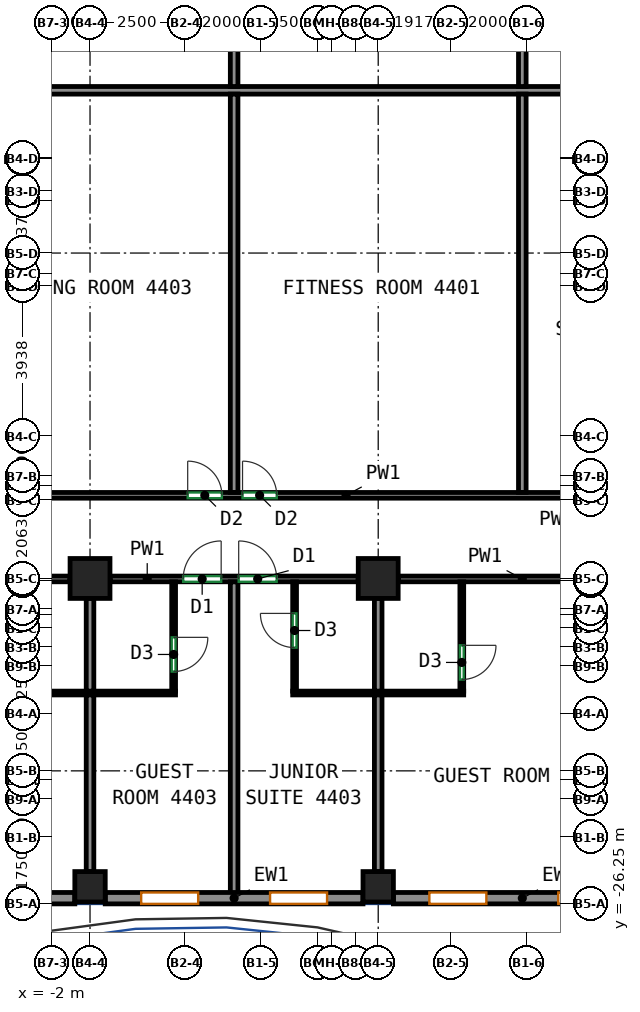
"""IFC4 building model, lengths in metres.
Left out: names, types, materials, properties, quantities, classifications, styles, units other than length and angle.
Written with IfcOpenShell. Run it as: python <this file> out.ifc"""

import sys

from ifc_helpers import new_model, si_unit, direction, frame, frame_2d, origin, origin_2d, place, context, subcontext, project, spatial, rectangle, extrude, source, transform, mapped, element, fill, save


model = new_model("IFC4")
c1 = context("Model", 3, precision=1e-05, world=origin(), true_north=direction((0.0, 1.0)))
c2 = subcontext(c1, "Body", "Model", "MODEL_VIEW")
j1 = project(units=[si_unit("LENGTHUNIT", "METRE"), si_unit("PLANEANGLEUNIT", "RADIAN")], contexts=[c1])
p1 = place(None, origin())
s1 = spatial("IfcSite", under=j1, at=p1, CompositionType="ELEMENT")
p2 = place(p1, origin())
s2 = spatial("IfcBuilding", under=s1, at=p2, CompositionType="ELEMENT")
p3 = place(p2, frame((0.0, 0.0, 185.5)))
s3 = spatial("IfcBuildingStorey", under=s2, at=p3, CompositionType="ELEMENT", Elevation=185.5)
m1 = source(origin(), c2, "Body", "SweptSolid", [
    extrude(rectangle(XDim=0.8, YDim=0.8, at=origin_2d()), origin(), (0.0, 0.0, 1.0), 3.12),
])
p4 = place(p3, frame((-1.0, -25.8, 0.0), z_axis=(0.0, 0.0, 1.0), x_axis=(1.0, 0.0, 0.0)))
e1 = element("IfcColumn", 1, at=p4, inside=s3, PredefinedType="COLUMN", context=c2, shape_type="MappedRepresentation", body=[
    mapped(m1, transform((0.0, 0.0, 0.0))),
])
m2 = source(origin(), c2, "Body", "SweptSolid", [
    extrude(rectangle(XDim=1.05, YDim=1.05, at=origin_2d()), origin(), (0.0, 0.0, 1.0), 3.12),
])
p5 = place(p3, frame((-1.0, -17.688, 0.0), z_axis=(0.0, 0.0, 1.0), x_axis=(1.0, 0.0, 0.0)))
e2 = element("IfcColumn", 2, at=p5, inside=s3, PredefinedType="COLUMN", context=c2, shape_type="MappedRepresentation", body=[
    mapped(m2, transform((0.0, 0.0, 0.0))),
])
p6 = place(p3, frame((6.583, -25.8, 0.0), z_axis=(0.0, 0.0, 1.0), x_axis=(1.0, 0.0, 0.0)))
e3 = element("IfcColumn", 3, at=p6, inside=s3, PredefinedType="COLUMN", context=c2, shape_type="MappedRepresentation", body=[
    mapped(m1, transform((0.0, 0.0, 0.0))),
])
p7 = place(p3, frame((6.583, -17.688, 0.0), z_axis=(0.0, 0.0, 1.0), x_axis=(1.0, 0.0, 0.0)))
e4 = element("IfcColumn", 4, at=p7, inside=s3, PredefinedType="COLUMN", context=c2, shape_type="MappedRepresentation", body=[
    mapped(m2, transform((0.0, 0.0, 0.0))),
])
m3 = source(origin(), c2, "Body", "SweptSolid", [
    extrude(rectangle(XDim=6.783, YDim=0.3, at=frame_2d((3.392, 0.0))), origin(), (0.0, 0.0, 1.0), 3.12),
])
p8 = place(p3, frame((-8.183, -26.1, 0.0), z_axis=(0.0, 0.0, 1.0), x_axis=(1.0, 0.0, 0.0)))
e5 = element("IfcWall", 5, at=p8, inside=s3, PredefinedType="SOLIDWALL", context=c2, shape_type="MappedRepresentation", body=[
    mapped(m3, transform((0.0, 0.0, 0.0))),
])
p9 = place(p8, frame((0.946, 0.0, 0.85)))
e6 = element("IfcOpeningElement", 6, at=p9, cuts=e5, PredefinedType="OPENING", context=c2, shape_type="SweptSolid", body=[
    extrude(rectangle(XDim=1.5, YDim=1.95, at=frame_2d((0.75, 0.975))), frame((0.0, 0.16, 0.0), z_axis=(0.0, -1.0, 0.0), x_axis=(1.0, 0.0, 0.0)), (0.0, 0.0, 1.0), 0.32),
])
p10 = place(p8, frame((4.337, 0.0, 0.85)))
e7 = element("IfcOpeningElement", 7, at=p10, cuts=e5, PredefinedType="OPENING", context=c2, shape_type="SweptSolid", body=[
    extrude(rectangle(XDim=1.5, YDim=1.95, at=frame_2d((0.75, 0.975))), frame((0.0, 0.16, 0.0), z_axis=(0.0, -1.0, 0.0), x_axis=(1.0, 0.0, 0.0)), (0.0, 0.0, 1.0), 0.32),
])
p11 = place(p3, frame((-0.6, -26.1, 0.0), z_axis=(0.0, 0.0, 1.0), x_axis=(1.0, 0.0, 0.0)))
e8 = element("IfcWall", 8, at=p11, inside=s3, PredefinedType="SOLIDWALL", context=c2, shape_type="MappedRepresentation", body=[
    mapped(m3, transform((0.0, 0.0, 0.0))),
])
p12 = place(p11, frame((0.946, 0.0, 0.85)))
e9 = element("IfcOpeningElement", 9, at=p12, cuts=e8, PredefinedType="OPENING", context=c2, shape_type="SweptSolid", body=[
    extrude(rectangle(XDim=1.5, YDim=1.95, at=frame_2d((0.75, 0.975))), frame((0.0, 0.16, 0.0), z_axis=(0.0, -1.0, 0.0), x_axis=(1.0, 0.0, 0.0)), (0.0, 0.0, 1.0), 0.32),
])
p13 = place(p11, frame((4.337, 0.0, 0.85)))
e10 = element("IfcOpeningElement", 10, at=p13, cuts=e8, PredefinedType="OPENING", context=c2, shape_type="SweptSolid", body=[
    extrude(rectangle(XDim=1.5, YDim=1.95, at=frame_2d((0.75, 0.975))), frame((0.0, 0.16, 0.0), z_axis=(0.0, -1.0, 0.0), x_axis=(1.0, 0.0, 0.0)), (0.0, 0.0, 1.0), 0.32),
])
m4 = source(origin(), c2, "Body", "SweptSolid", [
    extrude(rectangle(XDim=6.783, YDim=0.3, at=frame_2d((3.392, 0.0))), origin(), (0.0, 0.0, 1.0), 3.12),
])
p14 = place(p3, frame((6.983, -26.1, 0.0), z_axis=(0.0, 0.0, 1.0), x_axis=(1.0, 0.0, 0.0)))
e11 = element("IfcWall", 11, at=p14, inside=s3, PredefinedType="SOLIDWALL", context=c2, shape_type="MappedRepresentation", body=[
    mapped(m4, transform((0.0, 0.0, 0.0))),
])
p15 = place(p14, frame((0.946, 0.0, 0.85)))
e12 = element("IfcOpeningElement", 12, at=p15, cuts=e11, PredefinedType="OPENING", context=c2, shape_type="SweptSolid", body=[
    extrude(rectangle(XDim=1.5, YDim=1.95, at=frame_2d((0.75, 0.975))), frame((0.0, 0.16, 0.0), z_axis=(0.0, -1.0, 0.0), x_axis=(1.0, 0.0, 0.0)), (0.0, 0.0, 1.0), 0.32),
])
p16 = place(p14, frame((4.338, 0.0, 0.85)))
e13 = element("IfcOpeningElement", 13, at=p16, cuts=e11, PredefinedType="OPENING", context=c2, shape_type="SweptSolid", body=[
    extrude(rectangle(XDim=1.5, YDim=1.95, at=frame_2d((0.75, 0.975))), frame((0.0, 0.16, 0.0), z_axis=(0.0, -1.0, 0.0), x_axis=(1.0, 0.0, 0.0)), (0.0, 0.0, 1.0), 0.32),
])
p17 = place(p3, frame((-8.058, -17.7, 0.0), z_axis=(0.0, 0.0, 1.0), x_axis=(1.0, 0.0, 0.0)))
e14 = element("IfcWall", 14, at=p17, inside=s3, PredefinedType="PARTITIONING", context=c2, shape_type="SweptSolid", body=[
    extrude(rectangle(XDim=6.533, YDim=0.15, at=frame_2d((3.267, 0.0))), origin(), (0.0, 0.0, 1.0), 3.12),
])
p18 = place(p17, frame((3.26, 0.0, 0.0)))
e15 = element("IfcOpeningElement", 15, at=p18, cuts=e14, PredefinedType="OPENING", context=c2, shape_type="SweptSolid", body=[
    extrude(rectangle(XDim=1.0, YDim=2.1, at=frame_2d((0.5, 1.05))), frame((0.0, 0.085, 0.0), z_axis=(0.0, -1.0, 0.0), x_axis=(1.0, 0.0, 0.0)), (0.0, 0.0, 1.0), 0.17),
])
p19 = place(p3, frame((-0.475, -17.7, 0.0), z_axis=(0.0, 0.0, 1.0), x_axis=(1.0, 0.0, 0.0)))
e16 = element("IfcWall", 16, at=p19, inside=s3, PredefinedType="PARTITIONING", context=c2, shape_type="SweptSolid", body=[
    extrude(rectangle(XDim=6.533, YDim=0.15, at=frame_2d((3.267, 0.0))), origin(), (0.0, 0.0, 1.0), 3.12),
])
p20 = place(p19, frame((1.926, 0.0, 0.0)))
e17 = element("IfcOpeningElement", 17, at=p20, cuts=e16, PredefinedType="OPENING", context=c2, shape_type="SweptSolid", body=[
    extrude(rectangle(XDim=1.0, YDim=2.1, at=frame_2d((0.5, 1.05))), frame((0.0, 0.085, 0.0), z_axis=(0.0, -1.0, 0.0), x_axis=(1.0, 0.0, 0.0)), (0.0, 0.0, 1.0), 0.17),
])
p21 = place(p19, frame((3.387, 0.0, 0.0)))
e18 = element("IfcOpeningElement", 18, at=p21, cuts=e16, PredefinedType="OPENING", context=c2, shape_type="SweptSolid", body=[
    extrude(rectangle(XDim=1.0, YDim=2.1, at=frame_2d((0.5, 1.05))), frame((0.0, 0.085, 0.0), z_axis=(0.0, -1.0, 0.0), x_axis=(1.0, 0.0, 0.0)), (0.0, 0.0, 1.0), 0.17),
])
p22 = place(p3, frame((7.108, -17.7, 0.0), z_axis=(0.0, 0.0, 1.0), x_axis=(1.0, 0.0, 0.0)))
e19 = element("IfcWall", 19, at=p22, inside=s3, PredefinedType="PARTITIONING", context=c2, shape_type="SweptSolid", body=[
    extrude(rectangle(XDim=6.534, YDim=0.15, at=frame_2d((3.267, 0.0))), origin(), (0.0, 0.0, 1.0), 3.12),
])
p23 = place(p22, frame((4.722, 0.0, 0.0)))
e20 = element("IfcOpeningElement", 20, at=p23, cuts=e19, PredefinedType="OPENING", context=c2, shape_type="SweptSolid", body=[
    extrude(rectangle(XDim=1.0, YDim=2.1, at=frame_2d((0.5, 1.05))), frame((0.0, 0.085, 0.0), z_axis=(0.0, -1.0, 0.0), x_axis=(1.0, 0.0, 0.0)), (0.0, 0.0, 1.0), 0.17),
])
p24 = place(p3, frame((-4.802, -15.5, 0.0), z_axis=(0.0, 0.0, 1.0), x_axis=(1.0, 0.0, 0.0)))
e21 = element("IfcWall", 21, at=p24, inside=s3, PredefinedType="PARTITIONING", context=c2, shape_type="SweptSolid", body=[
    extrude(rectangle(XDim=21.077, YDim=0.15, at=frame_2d((10.539, 0.0))), origin(), (0.0, 0.0, 1.0), 3.12),
])
p25 = place(p24, frame((6.372, 0.0, 0.0)))
e22 = element("IfcOpeningElement", 22, at=p25, cuts=e21, PredefinedType="OPENING", context=c2, shape_type="SweptSolid", body=[
    extrude(rectangle(XDim=0.9, YDim=2.1, at=frame_2d((0.45, 1.05))), frame((0.0, 0.085, 0.0), z_axis=(0.0, -1.0, 0.0), x_axis=(1.0, 0.0, 0.0)), (0.0, 0.0, 1.0), 0.17),
])
p26 = place(p24, frame((7.815, 0.0, 0.0)))
e23 = element("IfcOpeningElement", 23, at=p26, cuts=e21, PredefinedType="OPENING", context=c2, shape_type="SweptSolid", body=[
    extrude(rectangle(XDim=0.9, YDim=2.1, at=frame_2d((0.45, 1.05))), frame((0.0, 0.085, 0.0), z_axis=(0.0, -1.0, 0.0), x_axis=(1.0, 0.0, 0.0)), (0.0, 0.0, 1.0), 0.17),
])
p27 = place(p3, frame((-3.25, -20.702, 0.0), z_axis=(0.0, 0.0, 1.0), x_axis=(1.0, 0.0, 0.0)))
e24 = element("IfcWall", 24, at=p27, inside=s3, PredefinedType="PARTITIONING", context=c2, shape_type="SweptSolid", body=[
    extrude(rectangle(XDim=4.5, YDim=0.1, at=frame_2d((2.25, 0.0))), origin(), (0.0, 0.0, 1.0), 3.12),
])
p28 = place(p3, frame((-1.0, -25.4, 0.0), z_axis=(0.0, 0.0, 1.0), x_axis=(0.0, 1.0, 0.0)))
e25 = element("IfcWall", 25, at=p28, inside=s3, PredefinedType="PARTITIONING", context=c2, shape_type="SweptSolid", body=[
    extrude(rectangle(XDim=4.648, YDim=0.2, at=frame_2d((2.324, 0.0))), origin(), (0.0, 0.0, 1.0), 3.12),
])
p29 = place(p3, frame((-1.0, -20.652, 0.0), z_axis=(0.0, 0.0, 1.0), x_axis=(0.0, 1.0, 0.0)))
e26 = element("IfcWall", 26, at=p29, inside=s3, PredefinedType="PARTITIONING", context=c2, shape_type="SweptSolid", body=[
    extrude(rectangle(XDim=2.44, YDim=0.2, at=frame_2d((1.22, 0.0))), origin(), (0.0, 0.0, 1.0), 3.12),
])
p30 = place(p3, frame((1.2, -17.777, 0.0), z_axis=(0.0, 0.0, 1.0), x_axis=(0.0, -1.0, 0.0)))
e27 = element("IfcWall", 27, at=p30, inside=s3, PredefinedType="PARTITIONING", context=c2, shape_type="SweptSolid", body=[
    extrude(rectangle(XDim=2.875, YDim=0.1, at=frame_2d((1.438, 0.0))), origin(), (0.0, 0.0, 1.0), 3.12),
])
p31 = place(p30, frame((1.46, 0.0, 0.0)))
e28 = element("IfcOpeningElement", 28, at=p31, cuts=e27, PredefinedType="OPENING", context=c2, shape_type="SweptSolid", body=[
    extrude(rectangle(XDim=0.9, YDim=2.1, at=frame_2d((0.45, 1.05))), frame((0.0, 0.06, 0.0), z_axis=(0.0, -1.0, 0.0), x_axis=(1.0, 0.0, 0.0)), (0.0, 0.0, 1.0), 0.12),
])
p32 = place(p3, frame((2.792, -26.0, 0.0), z_axis=(0.0, 0.0, 1.0), x_axis=(0.0, 1.0, 0.0)))
e29 = element("IfcWall", 29, at=p32, inside=s3, PredefinedType="PARTITIONING", context=c2, shape_type="SweptSolid", body=[
    extrude(rectangle(XDim=8.223, YDim=0.2, at=frame_2d((4.111, 0.0))), origin(), (0.0, 0.0, 1.0), 3.12),
])
p33 = place(p3, frame((4.383, -20.652, 0.0), z_axis=(0.0, 0.0, 1.0), x_axis=(0.0, 1.0, 0.0)))
e30 = element("IfcWall", 30, at=p33, inside=s3, PredefinedType="PARTITIONING", context=c2, shape_type="SweptSolid", body=[
    extrude(rectangle(XDim=2.875, YDim=0.1, at=frame_2d((1.438, 0.0))), origin(), (0.0, 0.0, 1.0), 3.12),
])
p34 = place(p33, frame((1.145, 0.0, 0.0)))
e31 = element("IfcOpeningElement", 31, at=p34, cuts=e30, PredefinedType="OPENING", context=c2, shape_type="SweptSolid", body=[
    extrude(rectangle(XDim=0.9, YDim=2.1, at=frame_2d((0.45, 1.05))), frame((0.0, 0.06, 0.0), z_axis=(0.0, -1.0, 0.0), x_axis=(1.0, 0.0, 0.0)), (0.0, 0.0, 1.0), 0.12),
])
p35 = place(p3, frame((4.333, -20.702, 0.0), z_axis=(0.0, 0.0, 1.0), x_axis=(1.0, 0.0, 0.0)))
e32 = element("IfcWall", 32, at=p35, inside=s3, PredefinedType="PARTITIONING", context=c2, shape_type="SweptSolid", body=[
    extrude(rectangle(XDim=4.5, YDim=0.1, at=frame_2d((2.25, 0.0))), origin(), (0.0, 0.0, 1.0), 3.12),
])
p36 = place(p3, frame((6.583, -25.4, 0.0), z_axis=(0.0, 0.0, 1.0), x_axis=(0.0, 1.0, 0.0)))
e33 = element("IfcWall", 33, at=p36, inside=s3, PredefinedType="PARTITIONING", context=c2, shape_type="SweptSolid", body=[
    extrude(rectangle(XDim=4.648, YDim=0.2, at=frame_2d((2.324, 0.0))), origin(), (0.0, 0.0, 1.0), 3.12),
])
p37 = place(p3, frame((6.583, -20.652, 0.0), z_axis=(0.0, 0.0, 1.0), x_axis=(0.0, 1.0, 0.0)))
e34 = element("IfcWall", 34, at=p37, inside=s3, PredefinedType="PARTITIONING", context=c2, shape_type="SweptSolid", body=[
    extrude(rectangle(XDim=2.44, YDim=0.2, at=frame_2d((1.22, 0.0))), origin(), (0.0, 0.0, 1.0), 3.12),
])
p38 = place(p3, frame((8.783, -17.777, 0.0), z_axis=(0.0, 0.0, 1.0), x_axis=(0.0, -1.0, 0.0)))
e35 = element("IfcWall", 35, at=p38, inside=s3, PredefinedType="PARTITIONING", context=c2, shape_type="SweptSolid", body=[
    extrude(rectangle(XDim=2.875, YDim=0.1, at=frame_2d((1.438, 0.0))), origin(), (0.0, 0.0, 1.0), 3.12),
])
p39 = place(p38, frame((1.67, 0.0, 0.0)))
e36 = element("IfcOpeningElement", 36, at=p39, cuts=e35, PredefinedType="OPENING", context=c2, shape_type="SweptSolid", body=[
    extrude(rectangle(XDim=0.9, YDim=2.1, at=frame_2d((0.45, 1.05))), frame((0.0, 0.06, 0.0), z_axis=(0.0, -1.0, 0.0), x_axis=(1.0, 0.0, 0.0)), (0.0, 0.0, 1.0), 0.12),
])
p40 = place(p3, frame((-13.873, -4.843, 0.0), z_axis=(0.0, 0.0, 1.0), x_axis=(1.0, 0.0, 0.0)))
e37 = element("IfcWall", 37, at=p40, inside=s3, PredefinedType="PARTITIONING", context=c2, shape_type="SweptSolid", body=[
    extrude(rectangle(XDim=30.146, YDim=0.2, at=frame_2d((15.073, 0.0))), origin(), (0.0, 0.0, 1.0), 3.12),
])
for number, where, z_axis, x_axis in (
    (38, (2.792, -4.743, 0.0), (0.0, 0.0, 1.0), (0.0, 1.0, 0.0)),
    (39, (10.375, -4.743, 0.0), (0.0, 0.0, 1.0), (0.0, 1.0, 0.0)),
):
    element("IfcWall", number, at=place(p3, frame(where, z_axis=z_axis, x_axis=x_axis)), inside=s3, PredefinedType="PARTITIONING", context=c2, shape_type="SweptSolid", body=[
        extrude(rectangle(XDim=8.366, YDim=0.2, at=frame_2d((4.183, 0.0))), origin(), (0.0, 0.0, 1.0), 3.12),
    ])
for number, where, z_axis, x_axis in (
    (40, (2.792, -15.423, 0.0), (0.0, 0.0, 1.0), (0.0, 1.0, 0.0)),
    (41, (10.375, -15.423, 0.0), (0.0, 0.0, 1.0), (0.0, 1.0, 0.0)),
):
    element("IfcWall", number, at=place(p3, frame(where, z_axis=z_axis, x_axis=x_axis)), inside=s3, PredefinedType="PARTITIONING", context=c2, shape_type="SweptSolid", body=[
        extrude(rectangle(XDim=10.48, YDim=0.2, at=frame_2d((5.24, 0.0))), origin(), (0.0, 0.0, 1.0), 3.12),
    ])
p41 = place(p12, origin())
e42 = element("IfcWindow", 42, at=p41, inside=s3, PartitioningType="SINGLE_PANEL", PredefinedType="WINDOW", context=c2, shape_type="SweptSolid", body=[
    extrude(rectangle(XDim=1.5, YDim=1.95, at=frame_2d((0.75, 0.975))), frame((0.0, 0.03, 0.0), z_axis=(0.0, -1.0, 0.0), x_axis=(1.0, 0.0, 0.0)), (0.0, 0.0, 1.0), 0.06),
])
fill(e9, e42)
p42 = place(p13, origin())
e43 = element("IfcWindow", 43, at=p42, inside=s3, PartitioningType="SINGLE_PANEL", PredefinedType="WINDOW", context=c2, shape_type="SweptSolid", body=[
    extrude(rectangle(XDim=1.5, YDim=1.95, at=frame_2d((0.75, 0.975))), frame((0.0, 0.03, 0.0), z_axis=(0.0, -1.0, 0.0), x_axis=(1.0, 0.0, 0.0)), (0.0, 0.0, 1.0), 0.06),
])
fill(e10, e43)
p43 = place(p15, origin())
e44 = element("IfcWindow", 44, at=p43, inside=s3, PartitioningType="SINGLE_PANEL", PredefinedType="WINDOW", context=c2, shape_type="SweptSolid", body=[
    extrude(rectangle(XDim=1.5, YDim=1.95, at=frame_2d((0.75, 0.975))), frame((0.0, 0.03, 0.0), z_axis=(0.0, -1.0, 0.0), x_axis=(1.0, 0.0, 0.0)), (0.0, 0.0, 1.0), 0.06),
])
fill(e12, e44)
p44 = place(p16, origin())
e45 = element("IfcWindow", 45, at=p44, inside=s3, PartitioningType="SINGLE_PANEL", PredefinedType="WINDOW", context=c2, shape_type="SweptSolid", body=[
    extrude(rectangle(XDim=1.5, YDim=1.95, at=frame_2d((0.75, 0.975))), frame((0.0, 0.03, 0.0), z_axis=(0.0, -1.0, 0.0), x_axis=(1.0, 0.0, 0.0)), (0.0, 0.0, 1.0), 0.06),
])
fill(e13, e45)
p45 = place(p39, origin())
e46 = element("IfcDoor", 46, at=p45, inside=s3, OperationType="SINGLE_SWING_LEFT", PredefinedType="DOOR", context=c2, shape_type="SweptSolid", body=[
    extrude(rectangle(XDim=0.9, YDim=2.1, at=frame_2d((0.45, 1.05))), frame((0.0, 0.025, 0.0), z_axis=(0.0, -1.0, 0.0), x_axis=(1.0, 0.0, 0.0)), (0.0, 0.0, 1.0), 0.05),
])
fill(e36, e46)
p46 = place(p31, origin())
e47 = element("IfcDoor", 47, at=p46, inside=s3, OperationType="SINGLE_SWING_LEFT", PredefinedType="DOOR", context=c2, shape_type="SweptSolid", body=[
    extrude(rectangle(XDim=0.9, YDim=2.1, at=frame_2d((0.45, 1.05))), frame((0.0, 0.025, 0.0), z_axis=(0.0, -1.0, 0.0), x_axis=(1.0, 0.0, 0.0)), (0.0, 0.0, 1.0), 0.05),
])
fill(e28, e47)
p47 = place(p34, origin())
e48 = element("IfcDoor", 48, at=p47, inside=s3, OperationType="SINGLE_SWING_RIGHT", PredefinedType="DOOR", context=c2, shape_type="SweptSolid", body=[
    extrude(rectangle(XDim=0.9, YDim=2.1, at=frame_2d((0.45, 1.05))), frame((0.0, 0.025, 0.0), z_axis=(0.0, -1.0, 0.0), x_axis=(1.0, 0.0, 0.0)), (0.0, 0.0, 1.0), 0.05),
])
fill(e31, e48)
p48 = place(p20, origin())
e49 = element("IfcDoor", 49, at=p48, inside=s3, OperationType="SINGLE_SWING_RIGHT", PredefinedType="DOOR", context=c2, shape_type="SweptSolid", body=[
    extrude(rectangle(XDim=1.0, YDim=2.1, at=frame_2d((0.5, 1.05))), frame((0.0, 0.025, 0.0), z_axis=(0.0, -1.0, 0.0), x_axis=(1.0, 0.0, 0.0)), (0.0, 0.0, 1.0), 0.05),
])
fill(e17, e49)
p49 = place(p21, origin())
e50 = element("IfcDoor", 50, at=p49, inside=s3, OperationType="SINGLE_SWING_LEFT", PredefinedType="DOOR", context=c2, shape_type="SweptSolid", body=[
    extrude(rectangle(XDim=1.0, YDim=2.1, at=frame_2d((0.5, 1.05))), frame((0.0, 0.025, 0.0), z_axis=(0.0, -1.0, 0.0), x_axis=(1.0, 0.0, 0.0)), (0.0, 0.0, 1.0), 0.05),
])
fill(e18, e50)
p50 = place(p25, origin())
e51 = element("IfcDoor", 51, at=p50, inside=s3, OperationType="SINGLE_SWING_LEFT", PredefinedType="DOOR", context=c2, shape_type="SweptSolid", body=[
    extrude(rectangle(XDim=0.9, YDim=2.1, at=frame_2d((0.45, 1.05))), frame((0.0, 0.025, 0.0), z_axis=(0.0, -1.0, 0.0), x_axis=(1.0, 0.0, 0.0)), (0.0, 0.0, 1.0), 0.05),
])
fill(e22, e51)
p51 = place(p26, origin())
e52 = element("IfcDoor", 52, at=p51, inside=s3, OperationType="SINGLE_SWING_LEFT", PredefinedType="DOOR", context=c2, shape_type="SweptSolid", body=[
    extrude(rectangle(XDim=0.9, YDim=2.1, at=frame_2d((0.45, 1.05))), frame((0.0, 0.025, 0.0), z_axis=(0.0, -1.0, 0.0), x_axis=(1.0, 0.0, 0.0)), (0.0, 0.0, 1.0), 0.05),
])
fill(e23, e52)
save(model, sys.argv[1])
